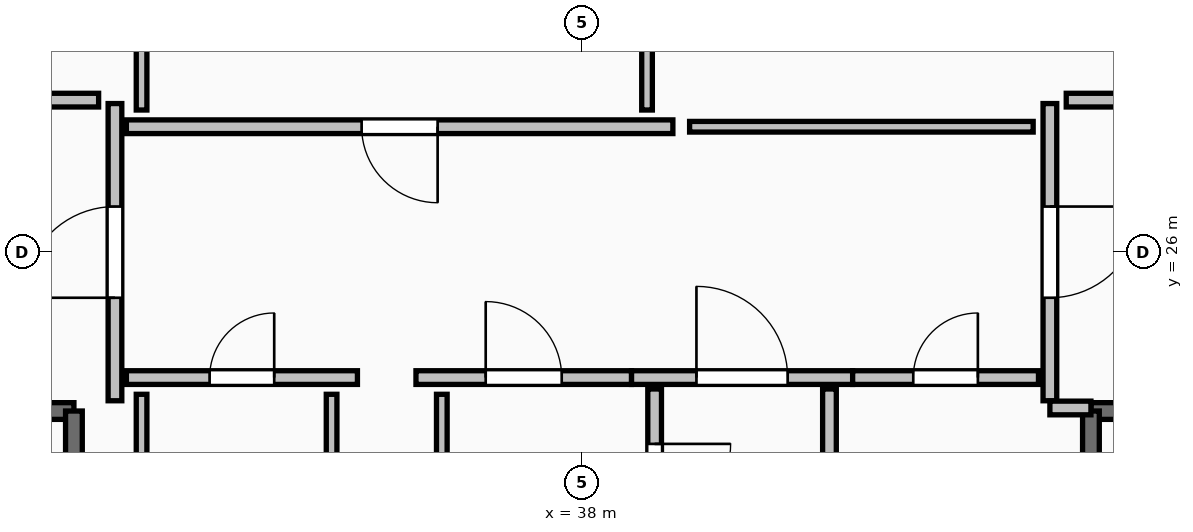
"""IFC4 building model, lengths in metres.
Left out: names, types, materials, properties, quantities, classifications, styles, units other than length and angle.
Written with IfcOpenShell. Run it as: python <this file> out.ifc"""

import sys

from ifc_helpers import new_model, si_unit, direction, frame, frame_2d, origin, place, context, subcontext, project, spatial, rectangle, extrude, element, fill, save


model = new_model("IFC4")
c1 = context("Model", 3, precision=1e-05, world=origin(), true_north=direction((0.0, 1.0)))
c2 = subcontext(c1, "Body", "Model", "MODEL_VIEW")
j1 = project(units=[si_unit("LENGTHUNIT", "METRE"), si_unit("PLANEANGLEUNIT", "RADIAN")], contexts=[c1])
p1 = place(None, origin())
s1 = spatial("IfcSite", under=j1, at=p1, CompositionType="ELEMENT")
p2 = place(p1, origin())
s2 = spatial("IfcBuilding", under=s1, at=p2, CompositionType="ELEMENT")
p3 = place(p2, frame((0.0, 0.0, 285.4)))
s3 = spatial("IfcBuildingStorey", under=s2, at=p3, CompositionType="ELEMENT", Elevation=285.4)
p4 = place(p3, frame((27.94, 23.91, 0.0), z_axis=(0.0, 0.0, 1.0), x_axis=(1.0, 0.0, 0.0)))
e1 = element("IfcWall", 1, at=p4, inside=s3, PredefinedType="SOLIDWALL", context=c2, shape_type="SweptSolid", body=[
    extrude(rectangle(XDim=3.37, YDim=0.22, at=frame_2d((1.685, 0.0))), origin(), (0.0, 0.0, 1.0), 4.69),
])
p5 = place(p4, frame((1.135, 0.0, 0.0)))
e2 = element("IfcOpeningElement", 2, at=p5, cuts=e1, PredefinedType="OPENING", context=c2, shape_type="SweptSolid", body=[
    extrude(rectangle(XDim=1.1, YDim=2.15, at=frame_2d((0.55, 1.075))), frame((0.0, 0.125, 0.0), z_axis=(0.0, -1.0, 0.0), x_axis=(1.0, 0.0, 0.0)), (0.0, 0.0, 1.0), 0.25),
])
p6 = place(p3, frame((31.31, 23.91, 0.0), z_axis=(0.0, 0.0, 1.0), x_axis=(0.0, -1.0, 0.0)))
e3 = element("IfcWall", 3, at=p6, inside=s3, PredefinedType="SOLIDWALL", context=c2, shape_type="SweptSolid", body=[
    extrude(rectangle(XDim=7.42, YDim=0.22, at=frame_2d((3.71, 0.0))), origin(), (0.0, 0.0, 1.0), 4.69),
])
p7 = place(p3, frame((44.69, 23.91, 0.0), z_axis=(0.0, 0.0, 1.0), x_axis=(1.0, 0.0, 0.0)))
e4 = element("IfcWall", 4, at=p7, inside=s3, PredefinedType="SOLIDWALL", context=c2, shape_type="SweptSolid", body=[
    extrude(rectangle(XDim=3.37, YDim=0.22, at=frame_2d((1.685, 0.0))), origin(), (0.0, 0.0, 1.0), 4.69),
])
p8 = place(p7, frame((1.135, 0.0, 0.0)))
e5 = element("IfcOpeningElement", 5, at=p8, cuts=e4, PredefinedType="OPENING", context=c2, shape_type="SweptSolid", body=[
    extrude(rectangle(XDim=1.1, YDim=2.15, at=frame_2d((0.55, 1.075))), frame((0.0, 0.125, 0.0), z_axis=(0.0, -1.0, 0.0), x_axis=(1.0, 0.0, 0.0)), (0.0, 0.0, 1.0), 0.25),
])
p9 = place(p3, frame((44.69, 16.49, 0.0), z_axis=(0.0, 0.0, 1.0), x_axis=(0.0, 1.0, 0.0)))
e6 = element("IfcWall", 6, at=p9, inside=s3, PredefinedType="SOLIDWALL", context=c2, shape_type="SweptSolid", body=[
    extrude(rectangle(XDim=7.42, YDim=0.22, at=frame_2d((3.71, 0.0))), origin(), (0.0, 0.0, 1.0), 4.69),
])
p10 = place(p3, frame((31.85, 24.045, 0.0), z_axis=(0.0, 0.0, 1.0), x_axis=(0.0, 1.0, 0.0)))
e7 = element("IfcWall", 7, at=p10, inside=s3, PredefinedType="PARTITIONING", context=c2, shape_type="SweptSolid", body=[
    extrude(rectangle(XDim=3.91, YDim=0.18, at=frame_2d((1.955, 0.0))), origin(), (0.0, 0.0, 1.0), 4.69),
])
p11 = place(p10, frame((1.355, 0.0, 0.0)))
e8 = element("IfcOpeningElement", 8, at=p11, cuts=e7, PredefinedType="OPENING", context=c2, shape_type="SweptSolid", body=[
    extrude(rectangle(XDim=1.2, YDim=2.15, at=frame_2d((0.6, 1.075))), frame((0.0, 0.105, 0.0), z_axis=(0.0, -1.0, 0.0), x_axis=(1.0, 0.0, 0.0)), (0.0, 0.0, 1.0), 0.21),
])
p12 = place(p3, frame((44.15, 27.955, 0.0), z_axis=(0.0, 0.0, 1.0), x_axis=(0.0, -1.0, 0.0)))
e9 = element("IfcWall", 9, at=p12, inside=s3, PredefinedType="PARTITIONING", context=c2, shape_type="SweptSolid", body=[
    extrude(rectangle(XDim=3.91, YDim=0.18, at=frame_2d((1.955, 0.0))), origin(), (0.0, 0.0, 1.0), 4.69),
])
p13 = place(p12, frame((1.355, 0.0, 0.0)))
e10 = element("IfcOpeningElement", 10, at=p13, cuts=e9, PredefinedType="OPENING", context=c2, shape_type="SweptSolid", body=[
    extrude(rectangle(XDim=1.2, YDim=2.15, at=frame_2d((0.6, 1.075))), frame((0.0, 0.105, 0.0), z_axis=(0.0, -1.0, 0.0), x_axis=(1.0, 0.0, 0.0)), (0.0, 0.0, 1.0), 0.21),
])
p14 = place(p3, frame((44.15, 23.95, 0.0), z_axis=(0.0, 0.0, 1.0), x_axis=(1.0, 0.0, 0.0)))
e11 = element("IfcWall", 11, at=p14, inside=s3, PredefinedType="PARTITIONING", context=c2, shape_type="SweptSolid", body=[
    extrude(rectangle(XDim=0.54, YDim=0.18, at=frame_2d((0.27, 0.0))), origin(), (0.0, 0.0, 1.0), 4.69),
])
p15 = place(p3, frame((38.645, 24.35, 0.0), z_axis=(0.0, 0.0, 1.0), x_axis=(1.0, 0.0, 0.0)))
e12 = element("IfcWall", 12, at=p15, inside=s3, PredefinedType="PARTITIONING", context=c2, shape_type="SweptSolid", body=[
    extrude(rectangle(XDim=2.91, YDim=0.18, at=frame_2d((1.455, 0.0))), origin(), (0.0, 0.0, 1.0), 4.69),
])
p16 = place(p15, frame((0.855, 0.0, 0.0)))
e13 = element("IfcOpeningElement", 13, at=p16, cuts=e12, PredefinedType="OPENING", context=c2, shape_type="SweptSolid", body=[
    extrude(rectangle(XDim=1.2, YDim=2.15, at=frame_2d((0.6, 1.075))), frame((0.0, 0.105, 0.0), z_axis=(0.0, -1.0, 0.0), x_axis=(1.0, 0.0, 0.0)), (0.0, 0.0, 1.0), 0.21),
])
p17 = place(p3, frame((41.555, 24.35, 0.0), z_axis=(0.0, 0.0, 1.0), x_axis=(1.0, 0.0, 0.0)))
e14 = element("IfcWall", 14, at=p17, inside=s3, PredefinedType="PARTITIONING", context=c2, shape_type="SweptSolid", body=[
    extrude(rectangle(XDim=2.445, YDim=0.18, at=frame_2d((1.223, 0.0))), origin(), (0.0, 0.0, 1.0), 4.69),
])
p18 = place(p17, frame((0.798, 0.0, 0.0)))
e15 = element("IfcOpeningElement", 15, at=p18, cuts=e14, PredefinedType="OPENING", context=c2, shape_type="SweptSolid", body=[
    extrude(rectangle(XDim=0.85, YDim=2.1, at=frame_2d((0.425, 1.05))), frame((0.0, 0.105, 0.0), z_axis=(0.0, -1.0, 0.0), x_axis=(1.0, 0.0, 0.0)), (0.0, 0.0, 1.0), 0.21),
])
p19 = place(p3, frame((39.19, 27.65, 0.0), z_axis=(0.0, 0.0, 1.0), x_axis=(-1.0, 0.0, 0.0)))
e16 = element("IfcWall", 16, at=p19, inside=s3, PredefinedType="PARTITIONING", context=c2, shape_type="SweptSolid", body=[
    extrude(rectangle(XDim=7.19, YDim=0.18, at=frame_2d((3.595, 0.0))), origin(), (0.0, 0.0, 1.0), 4.69),
])
p20 = place(p19, frame((3.095, 0.0, 0.0)))
e17 = element("IfcOpeningElement", 17, at=p20, cuts=e16, PredefinedType="OPENING", context=c2, shape_type="SweptSolid", body=[
    extrude(rectangle(XDim=1.0, YDim=2.15, at=frame_2d((0.5, 1.075))), frame((0.0, 0.105, 0.0), z_axis=(0.0, -1.0, 0.0), x_axis=(1.0, 0.0, 0.0)), (0.0, 0.0, 1.0), 0.21),
])
p21 = place(p3, frame((32.0, 24.35, 0.0), z_axis=(0.0, 0.0, 1.0), x_axis=(1.0, 0.0, 0.0)))
e18 = element("IfcWall", 18, at=p21, inside=s3, PredefinedType="PARTITIONING", context=c2, shape_type="SweptSolid", body=[
    extrude(rectangle(XDim=3.04, YDim=0.18, at=frame_2d((1.52, 0.0))), origin(), (0.0, 0.0, 1.0), 4.69),
])
p22 = place(p21, frame((1.095, 0.0, 0.0)))
e19 = element("IfcOpeningElement", 19, at=p22, cuts=e18, PredefinedType="OPENING", context=c2, shape_type="SweptSolid", body=[
    extrude(rectangle(XDim=0.85, YDim=2.1, at=frame_2d((0.425, 1.05))), frame((0.0, 0.105, 0.0), z_axis=(0.0, -1.0, 0.0), x_axis=(1.0, 0.0, 0.0)), (0.0, 0.0, 1.0), 0.21),
])
p23 = place(p3, frame((35.81, 24.35, 0.0), z_axis=(0.0, 0.0, 1.0), x_axis=(1.0, 0.0, 0.0)))
e20 = element("IfcWall", 20, at=p23, inside=s3, PredefinedType="PARTITIONING", context=c2, shape_type="SweptSolid", body=[
    extrude(rectangle(XDim=2.835, YDim=0.18, at=frame_2d((1.417, 0.0))), origin(), (0.0, 0.0, 1.0), 4.69),
])
p24 = place(p23, frame((0.917, 0.0, 0.0)))
e21 = element("IfcOpeningElement", 21, at=p24, cuts=e20, PredefinedType="OPENING", context=c2, shape_type="SweptSolid", body=[
    extrude(rectangle(XDim=1.0, YDim=2.15, at=frame_2d((0.5, 1.075))), frame((0.0, 0.105, 0.0), z_axis=(0.0, -1.0, 0.0), x_axis=(1.0, 0.0, 0.0)), (0.0, 0.0, 1.0), 0.21),
])
p25 = place(p3, frame((41.25, 20.305, 0.0), z_axis=(0.0, 0.0, 1.0), x_axis=(0.0, 1.0, 0.0)))
e22 = element("IfcWall", 22, at=p25, inside=s3, PredefinedType="PARTITIONING", context=c2, shape_type="SweptSolid", body=[
    extrude(rectangle(XDim=3.895, YDim=0.18, at=frame_2d((1.948, 0.0))), origin(), (0.0, 0.0, 1.0), 3.882),
])
p26 = place(p25, frame((1.522, 0.0, 0.0)))
e23 = element("IfcOpeningElement", 23, at=p26, cuts=e22, PredefinedType="OPENING", context=c2, shape_type="SweptSolid", body=[
    extrude(rectangle(XDim=0.85, YDim=2.1, at=frame_2d((0.425, 1.05))), frame((0.0, 0.105, 0.0), z_axis=(0.0, -1.0, 0.0), x_axis=(1.0, 0.0, 0.0)), (0.0, 0.0, 1.0), 0.21),
])
p27 = place(p3, frame((38.95, 24.2, 0.0), z_axis=(0.0, 0.0, 1.0), x_axis=(0.0, -1.0, 0.0)))
e24 = element("IfcWall", 24, at=p27, inside=s3, PredefinedType="PARTITIONING", context=c2, shape_type="SweptSolid", body=[
    extrude(rectangle(XDim=2.445, YDim=0.18, at=frame_2d((1.223, 0.0))), origin(), (0.0, 0.0, 1.0), 3.882),
])
p28 = place(p27, frame((0.722, 0.0, 0.0)))
e25 = element("IfcOpeningElement", 25, at=p28, cuts=e24, PredefinedType="OPENING", context=c2, shape_type="SweptSolid", body=[
    extrude(rectangle(XDim=1.0, YDim=2.15, at=frame_2d((0.5, 1.075))), frame((0.0, 0.105, 0.0), z_axis=(0.0, -1.0, 0.0), x_axis=(1.0, 0.0, 0.0)), (0.0, 0.0, 1.0), 0.21),
])
for number, where, z_axis, x_axis in (
    (26, (31.635, 28.0, 0.0), (0.0, 0.0, 1.0), (-1.0, 0.0, 0.0)),
    (27, (45.28, 28.0, 0.0), (0.0, 0.0, 1.0), (-1.0, 0.0, 0.0)),
):
    element("IfcWall", number, at=place(p3, frame(where, z_axis=z_axis, x_axis=x_axis)), inside=s3, PredefinedType="PARTITIONING", context=c2, shape_type="SweptSolid", body=[
        extrude(rectangle(XDim=0.915, YDim=0.18, at=frame_2d((0.458, 0.0))), origin(), (0.0, 0.0, 1.0), 4.69),
    ])
p29 = place(p3, frame((43.93, 27.65, 0.0), z_axis=(0.0, 0.0, 1.0), x_axis=(-1.0, 0.0, 0.0)))
e28 = element("IfcWall", 28, at=p29, inside=s3, PredefinedType="PARTITIONING", context=c2, shape_type="SweptSolid", body=[
    extrude(rectangle(XDim=4.52, YDim=0.14, at=frame_2d((2.26, 0.0))), origin(), (0.0, 0.0, 1.0), 4.69),
])
for number, where, z_axis, x_axis in (
    (29, (32.2, 30.26, 0.0), (0.0, 0.0, 1.0), (0.0, -1.0, 0.0)),
    (30, (38.85, 27.87, 0.0), (0.0, 0.0, 1.0), (0.0, 1.0, 0.0)),
):
    element("IfcWall", number, at=place(p3, frame(where, z_axis=z_axis, x_axis=x_axis)), inside=s3, PredefinedType="PARTITIONING", context=c2, shape_type="SweptSolid", body=[
        extrude(rectangle(XDim=2.39, YDim=0.14, at=frame_2d((1.195, 0.0))), origin(), (0.0, 0.0, 1.0), 4.69),
    ])
for number, where, z_axis, x_axis in (
    (31, (32.2, 24.13, 0.0), (0.0, 0.0, 1.0), (0.0, -1.0, 0.0)),
    (32, (34.7, 21.67, 0.0), (0.0, 0.0, 1.0), (0.0, 1.0, 0.0)),
    (33, (36.15, 24.13, 0.0), (0.0, 0.0, 1.0), (0.0, -1.0, 0.0)),
):
    element("IfcWall", number, at=place(p3, frame(where, z_axis=z_axis, x_axis=x_axis)), inside=s3, PredefinedType="PARTITIONING", context=c2, shape_type="SweptSolid", body=[
        extrude(rectangle(XDim=2.46, YDim=0.14, at=frame_2d((1.23, 0.0))), origin(), (0.0, 0.0, 1.0), 3.882),
    ])
p30 = place(p11, origin())
e34 = element("IfcDoor", 34, at=p30, inside=s3, OperationType="SINGLE_SWING_LEFT", PredefinedType="DOOR", context=c2, shape_type="SweptSolid", body=[
    extrude(rectangle(XDim=1.2, YDim=2.15, at=frame_2d((0.6, 1.075))), frame((0.0, 0.025, 0.0), z_axis=(0.0, -1.0, 0.0), x_axis=(1.0, 0.0, 0.0)), (0.0, 0.0, 1.0), 0.05),
])
fill(e8, e34)
p31 = place(p13, origin())
e35 = element("IfcDoor", 35, at=p31, inside=s3, OperationType="SINGLE_SWING_LEFT", PredefinedType="DOOR", context=c2, shape_type="SweptSolid", body=[
    extrude(rectangle(XDim=1.2, YDim=2.15, at=frame_2d((0.6, 1.075))), frame((0.0, 0.025, 0.0), z_axis=(0.0, -1.0, 0.0), x_axis=(1.0, 0.0, 0.0)), (0.0, 0.0, 1.0), 0.05),
])
fill(e10, e35)
p32 = place(p16, origin())
e36 = element("IfcDoor", 36, at=p32, inside=s3, OperationType="SINGLE_SWING_LEFT", PredefinedType="DOOR", context=c2, shape_type="SweptSolid", body=[
    extrude(rectangle(XDim=1.2, YDim=2.15, at=frame_2d((0.6, 1.075))), frame((0.0, 0.025, 0.0), z_axis=(0.0, -1.0, 0.0), x_axis=(1.0, 0.0, 0.0)), (0.0, 0.0, 1.0), 0.05),
])
fill(e13, e36)
p33 = place(p18, origin())
e37 = element("IfcDoor", 37, at=p33, inside=s3, OperationType="SINGLE_SWING_RIGHT", PredefinedType="DOOR", context=c2, shape_type="SweptSolid", body=[
    extrude(rectangle(XDim=0.85, YDim=2.1, at=frame_2d((0.425, 1.05))), frame((0.0, 0.025, 0.0), z_axis=(0.0, -1.0, 0.0), x_axis=(1.0, 0.0, 0.0)), (0.0, 0.0, 1.0), 0.05),
])
fill(e15, e37)
p34 = place(p20, origin())
e38 = element("IfcDoor", 38, at=p34, inside=s3, OperationType="SINGLE_SWING_LEFT", PredefinedType="DOOR", context=c2, shape_type="SweptSolid", body=[
    extrude(rectangle(XDim=1.0, YDim=2.15, at=frame_2d((0.5, 1.075))), frame((0.0, 0.025, 0.0), z_axis=(0.0, -1.0, 0.0), x_axis=(1.0, 0.0, 0.0)), (0.0, 0.0, 1.0), 0.05),
])
fill(e17, e38)
p35 = place(p22, origin())
e39 = element("IfcDoor", 39, at=p35, inside=s3, OperationType="SINGLE_SWING_RIGHT", PredefinedType="DOOR", context=c2, shape_type="SweptSolid", body=[
    extrude(rectangle(XDim=0.85, YDim=2.1, at=frame_2d((0.425, 1.05))), frame((0.0, 0.025, 0.0), z_axis=(0.0, -1.0, 0.0), x_axis=(1.0, 0.0, 0.0)), (0.0, 0.0, 1.0), 0.05),
])
fill(e19, e39)
p36 = place(p24, origin())
e40 = element("IfcDoor", 40, at=p36, inside=s3, OperationType="SINGLE_SWING_LEFT", PredefinedType="DOOR", context=c2, shape_type="SweptSolid", body=[
    extrude(rectangle(XDim=1.0, YDim=2.15, at=frame_2d((0.5, 1.075))), frame((0.0, 0.025, 0.0), z_axis=(0.0, -1.0, 0.0), x_axis=(1.0, 0.0, 0.0)), (0.0, 0.0, 1.0), 0.05),
])
fill(e21, e40)
p37 = place(p28, origin())
e41 = element("IfcDoor", 41, at=p37, inside=s3, OperationType="SINGLE_SWING_LEFT", PredefinedType="DOOR", context=c2, shape_type="SweptSolid", body=[
    extrude(rectangle(XDim=1.0, YDim=2.15, at=frame_2d((0.5, 1.075))), frame((0.0, 0.025, 0.0), z_axis=(0.0, -1.0, 0.0), x_axis=(1.0, 0.0, 0.0)), (0.0, 0.0, 1.0), 0.05),
])
fill(e25, e41)
save(model, sys.argv[1])
